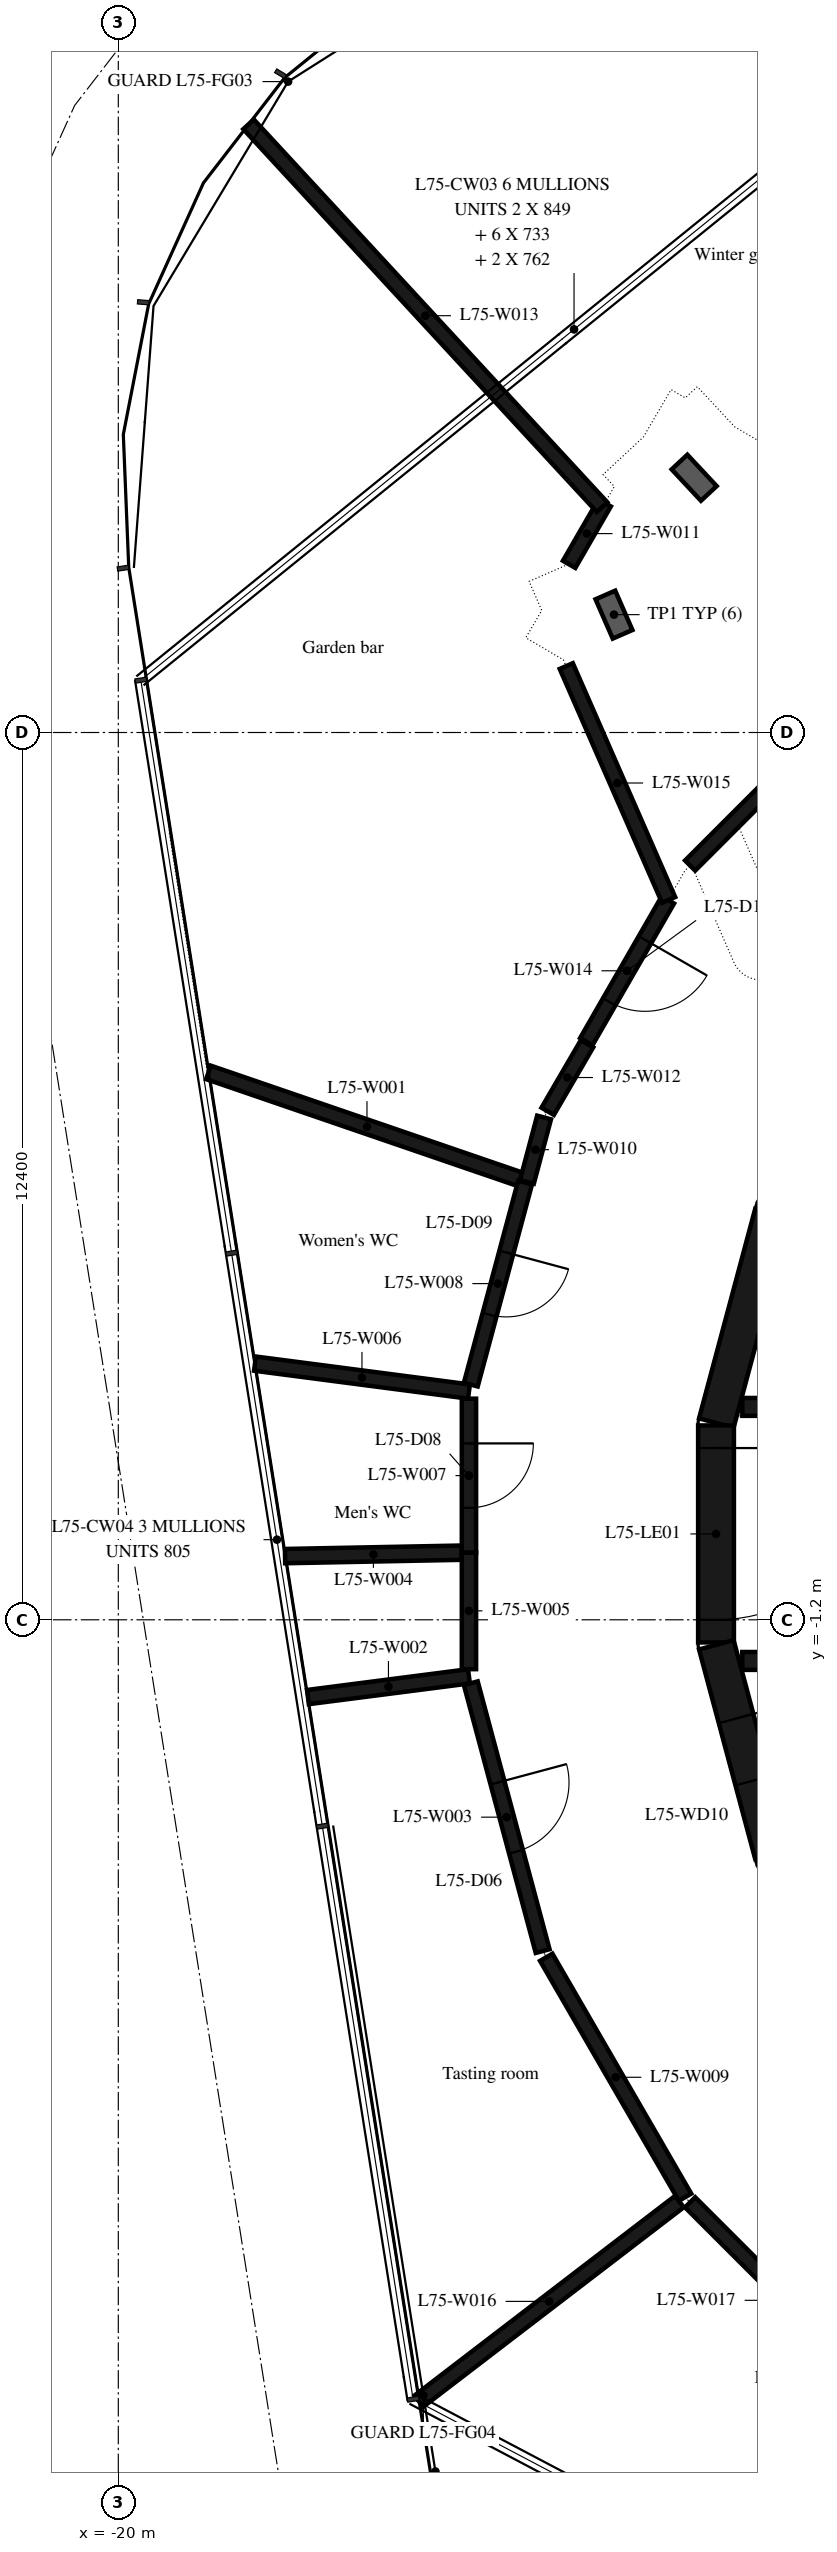
"""IFC4 building model, lengths in metres.
Left out: names, types, materials, properties, quantities, classifications, styles, units other than length and angle.
Written with IfcOpenShell. Run it as: python <this file> out.ifc"""

import sys

from ifc_helpers import new_model, si_unit, direction, frame, frame_2d, origin, place, context, subcontext, project, spatial, rectangle, extrude, element, fill, save


model = new_model("IFC4")
c1 = context("Model", 3, precision=1e-05, world=origin(), true_north=direction((0.0, 1.0)))
c2 = subcontext(c1, "Body", "Model", "MODEL_VIEW")
j1 = project(units=[si_unit("LENGTHUNIT", "METRE"), si_unit("PLANEANGLEUNIT", "RADIAN")], contexts=[c1])
p1 = place(None, origin())
s1 = spatial("IfcSite", under=j1, at=p1, CompositionType="ELEMENT")
p2 = place(p1, origin())
s2 = spatial("IfcBuilding", under=s1, at=p2, CompositionType="ELEMENT")
p3 = place(p2, frame((0.0, 0.0, 291.4)))
s3 = spatial("IfcBuildingStorey", under=s2, at=p3, CompositionType="ELEMENT", Elevation=291.4)
p4 = place(p3, frame((-10.858, 4.479, 0.0), z_axis=(0.0, 0.0, 1.0), x_axis=(-0.258734743916, -0.965948410781, 0.0)))
e1 = element("IfcWall", 1, at=p4, inside=s3, PredefinedType="SHEAR", context=c2, shape_type="SweptSolid", body=[
    extrude(rectangle(XDim=3.033, YDim=0.5, at=frame_2d((1.516, 0.0))), origin(), (0.0, 0.0, 1.0), 6.35),
])
p5 = place(p3, frame((-11.647, 1.516, 0.0), z_axis=(0.0, 0.0, 1.0), x_axis=(0.0, -1.0, 0.0)))
e2 = element("IfcWall", 2, at=p5, inside=s3, PredefinedType="SHEAR", context=c2, shape_type="SweptSolid", body=[
    extrude(rectangle(XDim=3.033, YDim=0.5, at=frame_2d((1.516, 0.0))), origin(), (0.0, 0.0, 1.0), 6.35),
])
p6 = place(p5, frame((0.316, 0.0, 0.0)))
e3 = element("IfcOpeningElement", 3, at=p6, cuts=e2, PredefinedType="OPENING", context=c2, shape_type="SweptSolid", body=[
    extrude(rectangle(XDim=2.4, YDim=2.1, at=frame_2d((1.2, 1.05))), frame((0.0, 0.26, 0.0), z_axis=(0.0, -1.0, 0.0), x_axis=(1.0, 0.0, 0.0)), (0.0, 0.0, 1.0), 0.52),
])
p7 = place(p3, frame((-11.643, -1.55, 0.0), z_axis=(0.0, 0.0, 1.0), x_axis=(0.258734743916, -0.965948410781, 0.0)))
e4 = element("IfcWall", 4, at=p7, inside=s3, PredefinedType="SHEAR", context=c2, shape_type="SweptSolid", body=[
    extrude(rectangle(XDim=3.033, YDim=0.5, at=frame_2d((1.516, 0.0))), origin(), (0.0, 0.0, 1.0), 6.35),
])
p8 = place(p7, frame((1.066, 0.0, 0.0)))
e5 = element("IfcOpeningElement", 5, at=p8, cuts=e4, PredefinedType="OPENING", context=c2, shape_type="SweptSolid", body=[
    extrude(rectangle(XDim=0.9, YDim=2.1, at=frame_2d((0.45, 1.05))), frame((0.0, 0.26, 0.0), z_axis=(0.0, -1.0, 0.0), x_axis=(1.0, 0.0, 0.0)), (0.0, 0.0, 1.0), 0.52),
])
p9 = place(p3, frame((-11.28, 1.775, 0.0), z_axis=(0.0, 0.0, 1.0), x_axis=(1.0, 0.0, 0.0)))
e6 = element("IfcWall", 6, at=p9, inside=s3, PredefinedType="SHEAR", context=c2, shape_type="SweptSolid", body=[
    extrude(rectangle(XDim=14.38, YDim=0.25, at=frame_2d((7.19, 0.0))), origin(), (0.0, 0.0, 1.0), 6.35),
])
p10 = place(p9, frame((4.38, 0.0, 0.0)))
e7 = element("IfcOpeningElement", 7, at=p10, cuts=e6, PredefinedType="OPENING", context=c2, shape_type="SweptSolid", body=[
    extrude(rectangle(XDim=0.9, YDim=2.1, at=frame_2d((0.45, 1.05))), frame((0.0, 0.135, 0.0), z_axis=(0.0, -1.0, 0.0), x_axis=(1.0, 0.0, 0.0)), (0.0, 0.0, 1.0), 0.27),
])
p11 = place(p9, frame((10.83, 0.0, 0.0)))
e8 = element("IfcOpeningElement", 8, at=p11, cuts=e6, PredefinedType="OPENING", context=c2, shape_type="SweptSolid", body=[
    extrude(rectangle(XDim=0.9, YDim=2.1, at=frame_2d((0.45, 1.05))), frame((0.0, 0.135, 0.0), z_axis=(0.0, -1.0, 0.0), x_axis=(1.0, 0.0, 0.0)), (0.0, 0.0, 1.0), 0.27),
])
p12 = place(p3, frame((-11.28, -1.775, 0.0), z_axis=(0.0, 0.0, 1.0), x_axis=(1.0, 0.0, 0.0)))
e9 = element("IfcWall", 9, at=p12, inside=s3, PredefinedType="SHEAR", context=c2, shape_type="SweptSolid", body=[
    extrude(rectangle(XDim=14.38, YDim=0.25, at=frame_2d((7.19, 0.0))), origin(), (0.0, 0.0, 1.0), 6.35),
])
p13 = place(p12, frame((6.43, 0.0, 0.0)))
e10 = element("IfcOpeningElement", 10, at=p13, cuts=e9, PredefinedType="OPENING", context=c2, shape_type="SweptSolid", body=[
    extrude(rectangle(XDim=1.1, YDim=2.1, at=frame_2d((0.55, 1.05))), frame((0.0, 0.135, 0.0), z_axis=(0.0, -1.0, 0.0), x_axis=(1.0, 0.0, 0.0)), (0.0, 0.0, 1.0), 0.27),
])
p14 = place(p12, frame((8.58, 0.0, 0.0)))
e11 = element("IfcOpeningElement", 11, at=p14, cuts=e9, PredefinedType="OPENING", context=c2, shape_type="SweptSolid", body=[
    extrude(rectangle(XDim=1.1, YDim=2.1, at=frame_2d((0.55, 1.05))), frame((0.0, 0.135, 0.0), z_axis=(0.0, -1.0, 0.0), x_axis=(1.0, 0.0, 0.0)), (0.0, 0.0, 1.0), 0.27),
])
p15 = place(p12, frame((10.73, 0.0, 0.0)))
e12 = element("IfcOpeningElement", 12, at=p15, cuts=e9, PredefinedType="OPENING", context=c2, shape_type="SweptSolid", body=[
    extrude(rectangle(XDim=1.1, YDim=2.1, at=frame_2d((0.55, 1.05))), frame((0.0, 0.135, 0.0), z_axis=(0.0, -1.0, 0.0), x_axis=(1.0, 0.0, 0.0)), (0.0, 0.0, 1.0), 0.27),
])
p16 = place(p12, frame((3.305, 0.0, 0.0)))
e13 = element("IfcOpeningElement", 13, at=p16, cuts=e9, PredefinedType="OPENING", context=c2, shape_type="SweptSolid", body=[
    extrude(rectangle(XDim=0.9, YDim=2.1, at=frame_2d((0.45, 1.05))), frame((0.0, 0.135, 0.0), z_axis=(0.0, -1.0, 0.0), x_axis=(1.0, 0.0, 0.0)), (0.0, 0.0, 1.0), 0.27),
])
p17 = place(p12, frame((12.98, 0.0, 0.0)))
e14 = element("IfcOpeningElement", 14, at=p17, cuts=e9, PredefinedType="OPENING", context=c2, shape_type="SweptSolid", body=[
    extrude(rectangle(XDim=0.9, YDim=2.1, at=frame_2d((0.45, 1.05))), frame((0.0, 0.135, 0.0), z_axis=(0.0, -1.0, 0.0), x_axis=(1.0, 0.0, 0.0)), (0.0, 0.0, 1.0), 0.27),
])
p18 = place(p3, frame((-18.74, 6.45, 0.0), z_axis=(0.0, 0.0, 1.0), x_axis=(0.945868240393, -0.324550877084, 0.0)))
e15 = element("IfcWall", 15, at=p18, inside=s3, PredefinedType="PARTITIONING", context=c2, shape_type="SweptSolid", body=[
    extrude(rectangle(XDim=4.683, YDim=0.2, at=frame_2d((2.342, 0.0))), origin(), (0.0, 0.0, 1.0), 6.35),
])
p19 = place(p3, frame((-17.35, -2.28, 0.0), z_axis=(0.0, 0.0, 1.0), x_axis=(0.991793720609, 0.127848409297, 0.0)))
e16 = element("IfcWall", 16, at=p19, inside=s3, PredefinedType="PARTITIONING", context=c2, shape_type="SweptSolid", body=[
    extrude(rectangle(XDim=2.269, YDim=0.2, at=frame_2d((1.134, 0.0))), origin(), (0.0, 0.0, 1.0), 6.35),
])
p20 = place(p3, frame((-15.074, -2.087, 0.0), z_axis=(0.0, 0.0, 1.0), x_axis=(0.259026804199, -0.965870133458, 0.0)))
e17 = element("IfcWall", 17, at=p20, inside=s3, PredefinedType="PARTITIONING", context=c2, shape_type="SweptSolid", body=[
    extrude(rectangle(XDim=3.876, YDim=0.2, at=frame_2d((1.938, 0.0))), origin(), (0.0, 0.0, 1.0), 6.35),
])
p21 = place(p20, frame((1.438, 0.0, 0.0)))
e18 = element("IfcOpeningElement", 18, at=p21, cuts=e17, PredefinedType="OPENING", context=c2, shape_type="SweptSolid", body=[
    extrude(rectangle(XDim=1.0, YDim=2.1, at=frame_2d((0.5, 1.05))), frame((0.0, 0.11, 0.0), z_axis=(0.0, -1.0, 0.0), x_axis=(1.0, 0.0, 0.0)), (0.0, 0.0, 1.0), 0.22),
])
p22 = place(p3, frame((-15.2, -0.262, 0.0), z_axis=(0.0, 0.0, 1.0), x_axis=(-0.999810471085, -0.019468485006, 0.0)))
e19 = element("IfcWall", 19, at=p22, inside=s3, PredefinedType="PARTITIONING", context=c2, shape_type="SweptSolid", body=[
    extrude(rectangle(XDim=2.47, YDim=0.2, at=frame_2d((1.235, 0.0))), origin(), (0.0, 0.0, 1.0), 6.35),
])
p23 = place(p3, frame((-15.1, -0.26, 0.0), z_axis=(0.0, 0.0, 1.0), x_axis=(0.0, -1.0, 0.0)))
e20 = element("IfcWall", 20, at=p23, inside=s3, PredefinedType="PARTITIONING", context=c2, shape_type="SweptSolid", body=[
    extrude(rectangle(XDim=1.63, YDim=0.2, at=frame_2d((0.815, 0.0))), origin(), (0.0, 0.0, 1.0), 6.35),
])
p24 = place(p3, frame((-15.1, 1.99, 0.0), z_axis=(0.0, 0.0, 1.0), x_axis=(-0.99160492548, 0.129304569772, 0.0)))
e21 = element("IfcWall", 21, at=p24, inside=s3, PredefinedType="PARTITIONING", context=c2, shape_type="SweptSolid", body=[
    extrude(rectangle(XDim=3.015, YDim=0.2, at=frame_2d((1.508, 0.0))), origin(), (0.0, 0.0, 1.0), 6.35),
])
p25 = place(p3, frame((-15.1, 1.89, 0.0), z_axis=(0.0, 0.0, 1.0), x_axis=(0.0, -1.0, 0.0)))
e22 = element("IfcWall", 22, at=p25, inside=s3, PredefinedType="PARTITIONING", context=c2, shape_type="SweptSolid", body=[
    extrude(rectangle(XDim=2.15, YDim=0.2, at=frame_2d((1.075, 0.0))), origin(), (0.0, 0.0, 1.0), 6.35),
])
p26 = place(p25, frame((0.625, 0.0, 0.0)))
e23 = element("IfcOpeningElement", 23, at=p26, cuts=e22, PredefinedType="OPENING", context=c2, shape_type="SweptSolid", body=[
    extrude(rectangle(XDim=0.9, YDim=2.1, at=frame_2d((0.45, 1.05))), frame((0.0, 0.11, 0.0), z_axis=(0.0, -1.0, 0.0), x_axis=(1.0, 0.0, 0.0)), (0.0, 0.0, 1.0), 0.22),
])
p27 = place(p3, frame((-14.315, 4.91, 0.0), z_axis=(0.0, 0.0, 1.0), x_axis=(-0.25947627481, -0.965749482428, 0.0)))
e24 = element("IfcWall", 24, at=p27, inside=s3, PredefinedType="PARTITIONING", context=c2, shape_type="SweptSolid", body=[
    extrude(rectangle(XDim=2.923, YDim=0.2, at=frame_2d((1.462, 0.0))), origin(), (0.0, 0.0, 1.0), 6.35),
])
p28 = place(p27, frame((1.012, 0.0, 0.0)))
e25 = element("IfcOpeningElement", 25, at=p28, cuts=e24, PredefinedType="OPENING", context=c2, shape_type="SweptSolid", body=[
    extrude(rectangle(XDim=0.9, YDim=2.1, at=frame_2d((0.45, 1.05))), frame((0.0, 0.11, 0.0), z_axis=(0.0, -1.0, 0.0), x_axis=(1.0, 0.0, 0.0)), (0.0, 0.0, 1.0), 0.22),
])
p29 = place(p3, frame((-14.02, -5.917, 0.0), z_axis=(0.0, 0.0, 1.0), x_axis=(0.500733182901, -0.865601686425, 0.0)))
e26 = element("IfcWall", 26, at=p29, inside=s3, PredefinedType="PARTITIONING", context=c2, shape_type="SweptSolid", body=[
    extrude(rectangle(XDim=3.874, YDim=0.2, at=frame_2d((1.937, 0.0))), origin(), (0.0, 0.0, 1.0), 6.35),
])
p30 = place(p3, frame((-14.05, 5.82, 0.0), z_axis=(0.0, 0.0, 1.0), x_axis=(-0.257613716205, -0.966247987435, 0.0)))
e27 = element("IfcWall", 27, at=p30, inside=s3, PredefinedType="PARTITIONING", context=c2, shape_type="SweptSolid", body=[
    extrude(rectangle(XDim=0.932, YDim=0.2, at=frame_2d((0.466, 0.0))), origin(), (0.0, 0.0, 1.0), 6.35),
])
p31 = place(p3, frame((-13.7, 13.55, 0.0), z_axis=(0.0, 0.0, 1.0), x_axis=(0.500425153996, 0.865779801825, 0.0)))
e28 = element("IfcWall", 28, at=p31, inside=s3, PredefinedType="PARTITIONING", context=c2, shape_type="SweptSolid", body=[
    extrude(rectangle(XDim=0.992, YDim=0.2, at=frame_2d((0.496, 0.0))), origin(), (0.0, 0.0, 1.0), 6.35),
])
p32 = place(p3, frame((-13.45, 6.85, 0.0), z_axis=(0.0, 0.0, 1.0), x_axis=(-0.503440074209, -0.864030145123, 0.0)))
e29 = element("IfcWall", 29, at=p32, inside=s3, PredefinedType="PARTITIONING", context=c2, shape_type="SweptSolid", body=[
    extrude(rectangle(XDim=1.092, YDim=0.2, at=frame_2d((0.546, 0.0))), origin(), (0.0, 0.0, 1.0), 6.35),
])
p33 = place(p3, frame((-13.24, 14.35, 0.0), z_axis=(0.0, 0.0, 1.0), x_axis=(-0.678399850878, 0.734692889804, 0.0)))
e30 = element("IfcWall", 30, at=p33, inside=s3, PredefinedType="PARTITIONING", context=c2, shape_type="SweptSolid", body=[
    extrude(rectangle(XDim=7.282, YDim=0.2, at=frame_2d((3.641, 0.0))), origin(), (0.0, 0.0, 1.0), 6.35),
])
p34 = place(p3, frame((-12.32, 8.86, 0.0), z_axis=(0.0, 0.0, 1.0), x_axis=(-0.498886625959, -0.866667257048, 0.0)))
e31 = element("IfcWall", 31, at=p34, inside=s3, PredefinedType="PARTITIONING", context=c2, shape_type="SweptSolid", body=[
    extrude(rectangle(XDim=2.285, YDim=0.2, at=frame_2d((1.143, 0.0))), origin(), (0.0, 0.0, 1.0), 6.35),
])
p35 = place(p34, frame((0.642, 0.0, 0.0)))
e32 = element("IfcOpeningElement", 32, at=p35, cuts=e31, PredefinedType="OPENING", context=c2, shape_type="SweptSolid", body=[
    extrude(rectangle(XDim=1.0, YDim=2.1, at=frame_2d((0.5, 1.05))), frame((0.0, 0.11, 0.0), z_axis=(0.0, -1.0, 0.0), x_axis=(1.0, 0.0, 0.0)), (0.0, 0.0, 1.0), 0.22),
])
p36 = place(p3, frame((-12.31, 8.86, 0.0), z_axis=(0.0, 0.0, 1.0), x_axis=(-0.400829604246, 0.916152622853, 0.0)))
e33 = element("IfcWall", 33, at=p36, inside=s3, PredefinedType="PARTITIONING", context=c2, shape_type="SweptSolid", body=[
    extrude(rectangle(XDim=3.567, YDim=0.2, at=frame_2d((1.784, 0.0))), origin(), (0.0, 0.0, 1.0), 6.35),
])
p37 = place(p3, frame((-12.159, -9.331, 0.0), z_axis=(0.0, 0.0, 1.0), x_axis=(-0.793799954034, -0.608178948152, 0.0)))
e34 = element("IfcWall", 34, at=p37, inside=s3, PredefinedType="PARTITIONING", context=c2, shape_type="SweptSolid", body=[
    extrude(rectangle(XDim=4.586, YDim=0.2, at=frame_2d((2.293, 0.0))), origin(), (0.0, 0.0, 1.0), 6.35),
])
p38 = place(p3, frame((-12.009, -9.341, 0.0), z_axis=(0.0, 0.0, 1.0), x_axis=(0.707106781187, -0.707106781187, 0.0)))
e35 = element("IfcWall", 35, at=p38, inside=s3, PredefinedType="PARTITIONING", context=c2, shape_type="SweptSolid", body=[
    extrude(rectangle(XDim=3.874, YDim=0.2, at=frame_2d((1.937, 0.0))), origin(), (0.0, 0.0, 1.0), 6.35),
])
p39 = place(p38, frame((1.437, 0.0, 0.0)))
e36 = element("IfcOpeningElement", 36, at=p39, cuts=e35, PredefinedType="OPENING", context=c2, shape_type="SweptSolid", body=[
    extrude(rectangle(XDim=1.0, YDim=2.1, at=frame_2d((0.5, 1.05))), frame((0.0, 0.11, 0.0), z_axis=(0.0, -1.0, 0.0), x_axis=(1.0, 0.0, 0.0)), (0.0, 0.0, 1.0), 0.22),
])
p40 = place(p3, frame((-12.009, 9.341, 0.0), z_axis=(0.0, 0.0, 1.0), x_axis=(0.707106781187, 0.707106781187, 0.0)))
e37 = element("IfcWall", 37, at=p40, inside=s3, PredefinedType="PARTITIONING", context=c2, shape_type="SweptSolid", body=[
    extrude(rectangle(XDim=3.874, YDim=0.2, at=frame_2d((1.937, 0.0))), origin(), (0.0, 0.0, 1.0), 6.35),
])
p41 = place(p6, origin())
e38 = element("IfcDoor", 38, at=p41, inside=s3, OperationType="DOUBLE_DOOR_SINGLE_SWING", PredefinedType="DOOR", context=c2, shape_type="SweptSolid", body=[
    extrude(rectangle(XDim=2.4, YDim=2.1, at=frame_2d((1.2, 1.05))), frame((0.0, 0.025, 0.0), z_axis=(0.0, -1.0, 0.0), x_axis=(1.0, 0.0, 0.0)), (0.0, 0.0, 1.0), 0.05),
])
fill(e3, e38)
p42 = place(p8, origin())
e39 = element("IfcDoor", 39, at=p42, inside=s3, OperationType="SINGLE_SWING_RIGHT", PredefinedType="DOOR", context=c2, shape_type="SweptSolid", body=[
    extrude(rectangle(XDim=0.9, YDim=2.1, at=frame_2d((0.45, 1.05))), frame((0.0, 0.025, 0.0), z_axis=(0.0, -1.0, 0.0), x_axis=(1.0, 0.0, 0.0)), (0.0, 0.0, 1.0), 0.05),
])
fill(e5, e39)
p43 = place(p21, origin())
e40 = element("IfcDoor", 40, at=p43, inside=s3, OperationType="SINGLE_SWING_LEFT", PredefinedType="DOOR", context=c2, shape_type="SweptSolid", body=[
    extrude(rectangle(XDim=1.0, YDim=2.1, at=frame_2d((0.5, 1.05))), frame((0.0, 0.025, 0.0), z_axis=(0.0, -1.0, 0.0), x_axis=(1.0, 0.0, 0.0)), (0.0, 0.0, 1.0), 0.05),
])
fill(e18, e40)
p44 = place(p26, origin())
e41 = element("IfcDoor", 41, at=p44, inside=s3, OperationType="SINGLE_SWING_LEFT", PredefinedType="DOOR", context=c2, shape_type="SweptSolid", body=[
    extrude(rectangle(XDim=0.9, YDim=2.1, at=frame_2d((0.45, 1.05))), frame((0.0, 0.025, 0.0), z_axis=(0.0, -1.0, 0.0), x_axis=(1.0, 0.0, 0.0)), (0.0, 0.0, 1.0), 0.05),
])
fill(e23, e41)
p45 = place(p28, origin())
e42 = element("IfcDoor", 42, at=p45, inside=s3, OperationType="SINGLE_SWING_LEFT", PredefinedType="DOOR", context=c2, shape_type="SweptSolid", body=[
    extrude(rectangle(XDim=0.9, YDim=2.1, at=frame_2d((0.45, 1.05))), frame((0.0, 0.025, 0.0), z_axis=(0.0, -1.0, 0.0), x_axis=(1.0, 0.0, 0.0)), (0.0, 0.0, 1.0), 0.05),
])
fill(e25, e42)
p46 = place(p35, origin())
e43 = element("IfcDoor", 43, at=p46, inside=s3, OperationType="SINGLE_SWING_LEFT", PredefinedType="DOOR", context=c2, shape_type="SweptSolid", body=[
    extrude(rectangle(XDim=1.0, YDim=2.1, at=frame_2d((0.5, 1.05))), frame((0.0, 0.025, 0.0), z_axis=(0.0, -1.0, 0.0), x_axis=(1.0, 0.0, 0.0)), (0.0, 0.0, 1.0), 0.05),
])
fill(e32, e43)
save(model, sys.argv[1])
